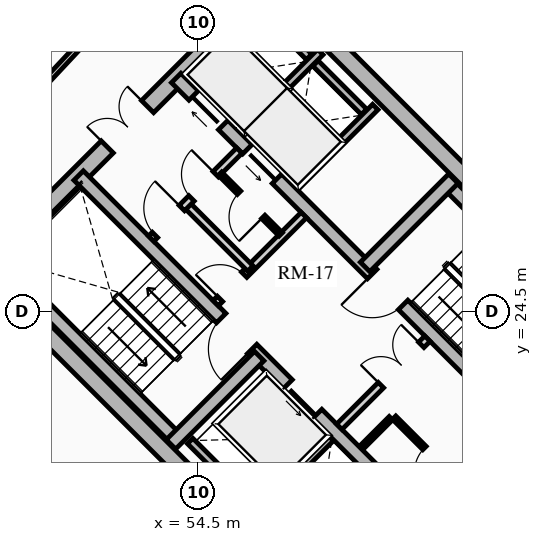
"""IFC4 building model, lengths in metres.
Left out: names, types, materials, properties, quantities, classifications, styles, units other than length and angle.
Written with IfcOpenShell. Run it as: python <this file> out.ifc"""

import sys

from ifc_helpers import new_model, si_unit, direction, frame, frame_2d, origin, place, context, subcontext, project, spatial, rectangle, extrude, source, transform, mapped, element, fill, save


model = new_model("IFC4")
c1 = context("Model", 3, precision=1e-05, world=origin(), true_north=direction((0.0, 1.0)))
c2 = subcontext(c1, "Body", "Model", "MODEL_VIEW")
j1 = project(units=[si_unit("LENGTHUNIT", "METRE"), si_unit("PLANEANGLEUNIT", "RADIAN")], contexts=[c1])
p1 = place(None, origin())
s1 = spatial("IfcSite", under=j1, at=p1, CompositionType="ELEMENT")
p2 = place(p1, origin())
s2 = spatial("IfcBuilding", under=s1, at=p2, CompositionType="ELEMENT")
p3 = place(p2, frame((0.0, 0.0, 122.53)))
s3 = spatial("IfcBuildingStorey", under=s2, at=p3, CompositionType="ELEMENT", Elevation=122.53)
for number, where, z_axis, x_axis in (
    (1, (58.737, 15.697, 0.0), (0.0, 0.0, 1.0), (-0.707, 0.707, 0.0)),
    (2, (66.303, 23.263, 0.0), (0.0, 0.0, 1.0), (-0.707, 0.707, 0.0)),
):
    element("IfcWall", number, at=place(p3, frame(where, z_axis=z_axis, x_axis=x_axis)), inside=s3, PredefinedType="SHEAR", context=c2, shape_type="SweptSolid", body=[
        extrude(rectangle(XDim=14.2, YDim=0.45, at=frame_2d((7.1, 0.0))), origin(), (0.0, 0.0, 1.0), 2.91),
    ])
p4 = place(p3, frame((58.578, 15.856, 0.0), z_axis=(0.0, 0.0, 1.0), x_axis=(0.707106781187, 0.707106781187, 0.0)))
e3 = element("IfcWall", 3, at=p4, inside=s3, PredefinedType="SHEAR", context=c2, shape_type="SweptSolid", body=[
    extrude(rectangle(XDim=10.7, YDim=0.45, at=frame_2d((5.35, 0.0))), origin(), (0.0, 0.0, 1.0), 2.91),
])
m1 = source(origin(), c2, "Body", "SweptSolid", [
    extrude(rectangle(XDim=1.5, YDim=2.02, at=frame_2d((0.75, 1.01))), frame((0.0, 0.235, 0.0), z_axis=(0.0, -1.0, 0.0), x_axis=(1.0, 0.0, 0.0)), (0.0, 0.0, 1.0), 0.47),
])
p5 = place(p4, frame((5.45, 0.0, 0.0)))
e4 = element("IfcOpeningElement", 4, at=p5, cuts=e3, PredefinedType="OPENING", context=c2, shape_type="MappedRepresentation", body=[
    mapped(m1, transform((0.0, 0.0, 0.0), x_axis=(1.0, 0.0, 0.0), y_axis=(0.0, 1.0, 0.0), z_axis=(0.0, 0.0, 1.0), scale=1.0)),
])
p6 = place(p3, frame((48.856, 25.578, 0.0), z_axis=(0.0, 0.0, 1.0), x_axis=(0.707106781187, 0.707106781187, 0.0)))
e5 = element("IfcWall", 5, at=p6, inside=s3, PredefinedType="SHEAR", context=c2, shape_type="SweptSolid", body=[
    extrude(rectangle(XDim=10.7, YDim=0.45, at=frame_2d((5.35, 0.0))), origin(), (0.0, 0.0, 1.0), 2.91),
])
p7 = place(p6, frame((4.6, 0.0, 0.0)))
e6 = element("IfcOpeningElement", 6, at=p7, cuts=e5, PredefinedType="OPENING", context=c2, shape_type="MappedRepresentation", body=[
    mapped(m1, transform((0.0, 0.0, 0.0), x_axis=(1.0, 0.0, 0.0), y_axis=(0.0, 1.0, 0.0), z_axis=(0.0, 0.0, 1.0), scale=1.0)),
])
p8 = place(p3, frame((61.078, 18.355, 0.0), z_axis=(0.0, 0.0, 1.0), x_axis=(-0.707106781187, 0.707106781187, 0.0)))
e7 = element("IfcWall", 7, at=p8, inside=s3, PredefinedType="SHEAR", context=c2, shape_type="SweptSolid", body=[
    extrude(rectangle(XDim=13.75, YDim=0.35, at=frame_2d((6.875, 0.0))), origin(), (0.0, 0.0, 1.0), 2.91),
])
m2 = source(origin(), c2, "Body", "SweptSolid", [
    extrude(rectangle(XDim=1.1, YDim=2.015, at=frame_2d((0.55, 1.007))), frame((0.0, 0.185, 0.0), z_axis=(0.0, -1.0, 0.0), x_axis=(1.0, 0.0, 0.0)), (0.0, 0.0, 1.0), 0.37),
])
p9 = place(p8, frame((4.875, 0.0, 0.0)))
e8 = element("IfcOpeningElement", 8, at=p9, cuts=e7, PredefinedType="OPENING", context=c2, shape_type="MappedRepresentation", body=[
    mapped(m2, transform((0.0, 0.0, 0.0), x_axis=(1.0, 0.0, 0.0), y_axis=(0.0, 1.0, 0.0), z_axis=(0.0, 0.0, 1.0), scale=1.0)),
])
m3 = source(origin(), c2, "Body", "SweptSolid", [
    extrude(rectangle(XDim=1.15, YDim=2.02, at=frame_2d((0.575, 1.01))), frame((0.0, 0.185, 0.0), z_axis=(0.0, -1.0, 0.0), x_axis=(1.0, 0.0, 0.0)), (0.0, 0.0, 1.0), 0.37),
])
p10 = place(p8, frame((7.295, 0.0, 0.0)))
e9 = element("IfcOpeningElement", 9, at=p10, cuts=e7, PredefinedType="OPENING", context=c2, shape_type="MappedRepresentation", body=[
    mapped(m3, transform((0.0, 0.0, 0.0), x_axis=(1.0, 0.0, 0.0), y_axis=(0.0, 1.0, 0.0), z_axis=(0.0, 0.0, 1.0), scale=1.0)),
])
p11 = place(p3, frame((63.645, 20.922, 0.0), z_axis=(0.0, 0.0, 1.0), x_axis=(-0.707106781187, 0.707106781187, 0.0)))
e10 = element("IfcWall", 10, at=p11, inside=s3, PredefinedType="SHEAR", context=c2, shape_type="SweptSolid", body=[
    extrude(rectangle(XDim=13.75, YDim=0.35, at=frame_2d((6.875, 0.0))), origin(), (0.0, 0.0, 1.0), 2.91),
])
p12 = place(p11, frame((10.0, 0.0, 0.0)))
e11 = element("IfcOpeningElement", 11, at=p12, cuts=e10, PredefinedType="OPENING", context=c2, shape_type="MappedRepresentation", body=[
    mapped(m2, transform((0.0, 0.0, 0.0), x_axis=(1.0, 0.0, 0.0), y_axis=(0.0, 1.0, 0.0), z_axis=(0.0, 0.0, 1.0), scale=1.0)),
])
p13 = place(p11, frame((12.0, 0.0, 0.0)))
e12 = element("IfcOpeningElement", 12, at=p13, cuts=e10, PredefinedType="OPENING", context=c2, shape_type="MappedRepresentation", body=[
    mapped(m2, transform((0.0, 0.0, 0.0), x_axis=(1.0, 0.0, 0.0), y_axis=(0.0, 1.0, 0.0), z_axis=(0.0, 0.0, 1.0), scale=1.0)),
])
p14 = place(p11, frame((5.305, 0.0, 0.0)))
e13 = element("IfcOpeningElement", 13, at=p14, cuts=e10, PredefinedType="OPENING", context=c2, shape_type="MappedRepresentation", body=[
    mapped(m3, transform((0.0, 0.0, 0.0), x_axis=(1.0, 0.0, 0.0), y_axis=(0.0, 1.0, 0.0), z_axis=(0.0, 0.0, 1.0), scale=1.0)),
])
p15 = place(p3, frame((53.922, 21.141, 0.0), z_axis=(0.0, 0.0, 1.0), x_axis=(-0.707088616009, 0.707124945897, 0.0)))
e14 = element("IfcWall", 14, at=p15, inside=s3, PredefinedType="SHEAR", context=c2, shape_type="SweptSolid", body=[
    extrude(rectangle(XDim=6.72, YDim=0.35, at=frame_2d((3.36, 0.0))), origin(), (0.0, 0.0, 1.0), 2.91),
])
p16 = place(p3, frame((53.784, 21.003, 0.0), z_axis=(0.0, 0.0, 1.0), x_axis=(0.707106781187, 0.707106781187, 0.0)))
e15 = element("IfcWall", 15, at=p16, inside=s3, PredefinedType="SHEAR", context=c2, shape_type="SweptSolid", body=[
    extrude(rectangle(XDim=3.285, YDim=0.35, at=frame_2d((1.643, 0.0))), origin(), (0.0, 0.0, 1.0), 2.91),
])
p17 = place(p3, frame((65.83, 23.107, 0.0), z_axis=(0.0, 0.0, 1.0), x_axis=(-0.707088616009, 0.707124945897, 0.0)))
e16 = element("IfcWall", 16, at=p17, inside=s3, PredefinedType="SHEAR", context=c2, shape_type="SweptSolid", body=[
    extrude(rectangle(XDim=6.72, YDim=0.35, at=frame_2d((3.36, 0.0))), origin(), (0.0, 0.0, 1.0), 2.91),
])
p18 = place(p3, frame((58.893, 25.674, 0.0), z_axis=(0.0, 0.0, 1.0), x_axis=(0.707106781187, 0.707106781187, 0.0)))
e17 = element("IfcWall", 17, at=p18, inside=s3, PredefinedType="SHEAR", context=c2, shape_type="SweptSolid", body=[
    extrude(rectangle(XDim=3.285, YDim=0.35, at=frame_2d((1.643, 0.0))), origin(), (0.0, 0.0, 1.0), 2.91),
])
p19 = place(p3, frame((55.888, 19.069, 0.0), z_axis=(0.0, 0.0, 1.0), x_axis=(0.707106781187, 0.707106781187, 0.0)))
e18 = element("IfcWall", 18, at=p19, inside=s3, PredefinedType="SHEAR", context=c2, shape_type="SweptSolid", body=[
    extrude(rectangle(XDim=2.97, YDim=0.2, at=frame_2d((1.485, 0.0))), origin(), (0.0, 0.0, 1.0), 2.91),
])
p20 = place(p3, frame((56.015, 19.366, 0.0), z_axis=(0.0, 0.0, 1.0), x_axis=(-0.707106781187, 0.707106781187, 0.0)))
e19 = element("IfcWall", 19, at=p20, inside=s3, PredefinedType="SHEAR", context=c2, shape_type="SweptSolid", body=[
    extrude(rectangle(XDim=2.44, YDim=0.2, at=frame_2d((1.22, 0.0))), origin(), (0.0, 0.0, 1.0), 2.91),
])
p21 = place(p3, frame((57.062, 27.781, 0.0), z_axis=(0.0, 0.0, 1.0), x_axis=(0.707106781187, 0.707106781187, 0.0)))
e20 = element("IfcWall", 20, at=p21, inside=s3, PredefinedType="SHEAR", context=c2, shape_type="SweptSolid", body=[
    extrude(rectangle(XDim=2.97, YDim=0.2, at=frame_2d((1.485, 0.0))), origin(), (0.0, 0.0, 1.0), 2.91),
])
p22 = place(p3, frame((55.615, 29.227, 0.0), z_axis=(0.0, 0.0, 1.0), x_axis=(0.707147878904, 0.70706568108, 0.0)))
e21 = element("IfcWall", 21, at=p22, inside=s3, PredefinedType="SHEAR", context=c2, shape_type="SweptSolid", body=[
    extrude(rectangle(XDim=2.97, YDim=0.2, at=frame_2d((1.485, 0.0))), origin(), (0.0, 0.0, 1.0), 2.91),
])
p23 = place(p3, frame((58.865, 29.754, 0.0), z_axis=(0.0, 0.0, 1.0), x_axis=(-0.707174411312, 0.707039144592, 0.0)))
e22 = element("IfcWall", 22, at=p23, inside=s3, PredefinedType="SHEAR", context=c2, shape_type="SweptSolid", body=[
    extrude(rectangle(XDim=1.805, YDim=0.2, at=frame_2d((0.902, 0.0))), origin(), (0.0, 0.0, 1.0), 2.91),
])
p24 = place(p3, frame((57.419, 31.2, 0.0), z_axis=(0.0, 0.0, 1.0), x_axis=(-0.707032117043, 0.707181437447, 0.0)))
e23 = element("IfcWall", 23, at=p24, inside=s3, PredefinedType="SHEAR", context=c2, shape_type="SweptSolid", body=[
    extrude(rectangle(XDim=1.635, YDim=0.2, at=frame_2d((0.817, 0.0))), origin(), (0.0, 0.0, 1.0), 2.91),
])
p25 = place(p3, frame((58.214, 21.467, 0.0), z_axis=(0.0, 0.0, 1.0), x_axis=(0.707106781187, 0.707106781187, 0.0)))
e24 = element("IfcWall", 24, at=p25, inside=s3, PredefinedType="PARTITIONING", context=c2, shape_type="SweptSolid", body=[
    extrude(rectangle(XDim=3.28, YDim=0.2, at=frame_2d((1.64, 0.0))), origin(), (0.0, 0.0, 1.0), 2.615),
])
m4 = source(origin(), c2, "Body", "SweptSolid", [
    extrude(rectangle(XDim=1.5, YDim=2.02, at=frame_2d((0.75, 1.01))), frame((0.0, 0.11, 0.0), z_axis=(0.0, -1.0, 0.0), x_axis=(1.0, 0.0, 0.0)), (0.0, 0.0, 1.0), 0.22),
])
p26 = place(p25, frame((1.55, 0.0, 0.0)))
e25 = element("IfcOpeningElement", 25, at=p26, cuts=e24, PredefinedType="OPENING", context=c2, shape_type="MappedRepresentation", body=[
    mapped(m4, transform((0.0, 0.0, 0.0), x_axis=(1.0, 0.0, 0.0), y_axis=(0.0, 1.0, 0.0), z_axis=(0.0, 0.0, 1.0), scale=1.0)),
])
p27 = place(p3, frame((54.961, 24.719, 0.0), z_axis=(0.0, 0.0, 1.0), x_axis=(0.707106781187, 0.707106781187, 0.0)))
e26 = element("IfcWall", 26, at=p27, inside=s3, PredefinedType="PARTITIONING", context=c2, shape_type="SweptSolid", body=[
    extrude(rectangle(XDim=3.28, YDim=0.2, at=frame_2d((1.64, 0.0))), origin(), (0.0, 0.0, 1.0), 2.615),
])
m5 = source(origin(), c2, "Body", "SweptSolid", [
    extrude(rectangle(XDim=0.9, YDim=2.005, at=frame_2d((0.45, 1.002))), frame((0.0, 0.11, 0.0), z_axis=(0.0, -1.0, 0.0), x_axis=(1.0, 0.0, 0.0)), (0.0, 0.0, 1.0), 0.22),
])
p28 = place(p27, frame((0.16, 0.0, 0.0)))
e27 = element("IfcOpeningElement", 27, at=p28, cuts=e26, PredefinedType="OPENING", context=c2, shape_type="MappedRepresentation", body=[
    mapped(m5, transform((0.0, 0.0, 0.0), x_axis=(1.0, 0.0, 0.0), y_axis=(0.0, 1.0, 0.0), z_axis=(0.0, 0.0, 1.0), scale=1.0)),
])
p29 = place(p3, frame((55.874, 25.631, 0.0), z_axis=(0.0, 0.0, 1.0), x_axis=(-0.707157639372, 0.707055919343, 0.0)))
e28 = element("IfcWall", 28, at=p29, inside=s3, PredefinedType="PARTITIONING", context=c2, shape_type="SweptSolid", body=[
    extrude(rectangle(XDim=2.4, YDim=0.2, at=frame_2d((1.2, 0.0))), origin(), (0.0, 0.0, 1.0), 2.615),
])
p30 = place(p3, frame((53.264, 26.416, 0.0), z_axis=(0.0, 0.0, 1.0), x_axis=(0.707106781187, 0.707106781187, 0.0)))
e29 = element("IfcWall", 29, at=p30, inside=s3, PredefinedType="PARTITIONING", context=c2, shape_type="SweptSolid", body=[
    extrude(rectangle(XDim=3.28, YDim=0.2, at=frame_2d((1.64, 0.0))), origin(), (0.0, 0.0, 1.0), 2.615),
])
m6 = source(origin(), c2, "Body", "SweptSolid", [
    extrude(rectangle(XDim=1.0, YDim=2.015, at=frame_2d((0.5, 1.007))), frame((0.0, 0.11, 0.0), z_axis=(0.0, -1.0, 0.0), x_axis=(1.0, 0.0, 0.0)), (0.0, 0.0, 1.0), 0.22),
])
p31 = place(p30, frame((0.14, 0.0, 0.0)))
e30 = element("IfcOpeningElement", 30, at=p31, cuts=e29, PredefinedType="OPENING", context=c2, shape_type="MappedRepresentation", body=[
    mapped(m6, transform((0.0, 0.0, 0.0), x_axis=(1.0, 0.0, 0.0), y_axis=(0.0, 1.0, 0.0), z_axis=(0.0, 0.0, 1.0), scale=1.0)),
])
p32 = place(p30, frame((1.5, 0.0, 0.0)))
e31 = element("IfcOpeningElement", 31, at=p32, cuts=e29, PredefinedType="OPENING", context=c2, shape_type="MappedRepresentation", body=[
    mapped(m5, transform((0.0, 0.0, 0.0), x_axis=(1.0, 0.0, 0.0), y_axis=(0.0, 1.0, 0.0), z_axis=(0.0, 0.0, 1.0), scale=1.0)),
])
p33 = place(p3, frame((61.835, 19.529, 0.0), z_axis=(0.0, 0.0, 1.0), x_axis=(-0.707146413884, 0.707067146267, 0.0)))
e32 = element("IfcWall", 32, at=p33, inside=s3, PredefinedType="PARTITIONING", context=c2, shape_type="SweptSolid", body=[
    extrude(rectangle(XDim=3.08, YDim=0.125, at=frame_2d((1.54, 0.0))), origin(), (0.0, 0.0, 1.0), 2.615),
])
m7 = source(origin(), c2, "Body", "SweptSolid", [
    extrude(rectangle(XDim=0.9, YDim=2.005, at=frame_2d((0.45, 1.002))), frame((0.0, 0.073, 0.0), z_axis=(0.0, -1.0, 0.0), x_axis=(1.0, 0.0, 0.0)), (0.0, 0.0, 1.0), 0.145),
])
p34 = place(p33, frame((1.05, 0.0, 0.0)))
e33 = element("IfcOpeningElement", 33, at=p34, cuts=e32, PredefinedType="OPENING", context=c2, shape_type="MappedRepresentation", body=[
    mapped(m7, transform((0.0, 0.0, 0.0), x_axis=(1.0, 0.0, 0.0), y_axis=(0.0, 1.0, 0.0), z_axis=(0.0, 0.0, 1.0), scale=1.0)),
])
p35 = place(p3, frame((58.794, 20.915, 0.0), z_axis=(0.0, 0.0, 1.0), x_axis=(0.707106781187, 0.707106781187, 0.0)))
e34 = element("IfcWall", 34, at=p35, inside=s3, PredefinedType="PARTITIONING", context=c2, shape_type="SweptSolid", body=[
    extrude(rectangle(XDim=1.1, YDim=0.125, at=frame_2d((0.55, 0.0))), origin(), (0.0, 0.0, 1.0), 2.615),
])
p36 = place(p3, frame((56.673, 26.529, 0.0), z_axis=(0.0, 0.0, 1.0), x_axis=(-0.707052764397, 0.70716079385, 0.0)))
e35 = element("IfcWall", 35, at=p36, inside=s3, PredefinedType="PARTITIONING", context=c2, shape_type="SweptSolid", body=[
    extrude(rectangle(XDim=2.26, YDim=0.125, at=frame_2d((1.13, 0.0))), origin(), (0.0, 0.0, 1.0), 2.615),
])
p37 = place(p36, frame((0.65, 0.0, 0.0)))
e36 = element("IfcOpeningElement", 36, at=p37, cuts=e35, PredefinedType="OPENING", context=c2, shape_type="MappedRepresentation", body=[
    mapped(m7, transform((0.0, 0.0, 0.0), x_axis=(1.0, 0.0, 0.0), y_axis=(0.0, 1.0, 0.0), z_axis=(0.0, 0.0, 1.0), scale=1.0)),
])
p38 = place(p3, frame((63.086, 30.086, 0.0), z_axis=(0.0, 0.0, 1.0), x_axis=(-0.699032802832, 0.715089603172, 0.0)))
e37 = element("IfcWall", 37, at=p38, inside=s3, PredefinedType="PARTITIONING", context=c2, shape_type="SweptSolid", body=[
    extrude(rectangle(XDim=6.082, YDim=0.15, at=frame_2d((3.041, 0.0))), origin(), (0.0, 0.0, 1.0), 2.185),
])
p39 = place(p3, frame((52.079, 32.244, 0.0), z_axis=(0.0, 0.0, 1.0), x_axis=(-0.682703325574, -0.730695674854, 0.0)))
e38 = element("IfcWall", 38, at=p39, inside=s3, PredefinedType="PARTITIONING", context=c2, shape_type="SweptSolid", body=[
    extrude(rectangle(XDim=6.527, YDim=0.15, at=frame_2d((3.263, 0.0))), origin(), (0.0, 0.0, 1.0), 2.185),
])
p40 = place(p3, frame((47.729, 23.23, 0.0), z_axis=(0.0, 0.0, 1.0), x_axis=(0.696119834292, -0.717925606386, 0.0)))
e39 = element("IfcWall", 39, at=p40, inside=s3, PredefinedType="PARTITIONING", context=c2, shape_type="SweptSolid", body=[
    extrude(rectangle(XDim=6.012, YDim=0.15, at=frame_2d((3.006, 0.0))), origin(), (0.0, 0.0, 1.0), 2.615),
])
m8 = source(origin(), c2, "Body", "SweptSolid", [
    extrude(rectangle(XDim=1.1, YDim=2.015, at=frame_2d((0.55, 1.007))), frame((0.0, 0.025, 0.0), z_axis=(0.0, -1.0, 0.0), x_axis=(1.0, 0.0, 0.0)), (0.0, 0.0, 1.0), 0.05),
])
p41 = place(p9, origin())
e40 = element("IfcDoor", 40, at=p41, inside=s3, OperationType="SLIDING_TO_LEFT", PredefinedType="DOOR", context=c2, shape_type="MappedRepresentation", body=[
    mapped(m8, transform((0.0, 0.0, 0.0), x_axis=(1.0, 0.0, 0.0), y_axis=(0.0, 1.0, 0.0), z_axis=(0.0, 0.0, 1.0), scale=1.0)),
])
fill(e8, e40)
p42 = place(p12, origin())
e41 = element("IfcDoor", 41, at=p42, inside=s3, OperationType="SLIDING_TO_LEFT", PredefinedType="DOOR", context=c2, shape_type="MappedRepresentation", body=[
    mapped(m8, transform((0.0, 0.0, 0.0), x_axis=(1.0, 0.0, 0.0), y_axis=(0.0, 1.0, 0.0), z_axis=(0.0, 0.0, 1.0), scale=1.0)),
])
fill(e11, e41)
p43 = place(p13, origin())
e42 = element("IfcDoor", 42, at=p43, inside=s3, OperationType="SLIDING_TO_RIGHT", PredefinedType="DOOR", context=c2, shape_type="MappedRepresentation", body=[
    mapped(m8, transform((0.0, 0.0, 0.0), x_axis=(1.0, 0.0, 0.0), y_axis=(0.0, 1.0, 0.0), z_axis=(0.0, 0.0, 1.0), scale=1.0)),
])
fill(e12, e42)
m9 = source(origin(), c2, "Body", "SweptSolid", [
    extrude(rectangle(XDim=1.15, YDim=2.02, at=frame_2d((0.575, 1.01))), frame((0.0, 0.025, 0.0), z_axis=(0.0, -1.0, 0.0), x_axis=(1.0, 0.0, 0.0)), (0.0, 0.0, 1.0), 0.05),
])
p44 = place(p10, origin())
e43 = element("IfcDoor", 43, at=p44, inside=s3, OperationType="SINGLE_SWING_LEFT", PredefinedType="DOOR", context=c2, shape_type="MappedRepresentation", body=[
    mapped(m9, transform((0.0, 0.0, 0.0), x_axis=(1.0, 0.0, 0.0), y_axis=(0.0, 1.0, 0.0), z_axis=(0.0, 0.0, 1.0), scale=1.0)),
])
fill(e9, e43)
p45 = place(p14, origin())
e44 = element("IfcDoor", 44, at=p45, inside=s3, OperationType="SINGLE_SWING_RIGHT", PredefinedType="DOOR", context=c2, shape_type="MappedRepresentation", body=[
    mapped(m9, transform((0.0, 0.0, 0.0), x_axis=(1.0, 0.0, 0.0), y_axis=(0.0, 1.0, 0.0), z_axis=(0.0, 0.0, 1.0), scale=1.0)),
])
fill(e13, e44)
m10 = source(origin(), c2, "Body", "SweptSolid", [
    extrude(rectangle(XDim=1.5, YDim=2.02, at=frame_2d((0.75, 1.01))), frame((0.0, 0.025, 0.0), z_axis=(0.0, -1.0, 0.0), x_axis=(1.0, 0.0, 0.0)), (0.0, 0.0, 1.0), 0.05),
])
p46 = place(p7, origin())
e45 = element("IfcDoor", 45, at=p46, inside=s3, OperationType="DOUBLE_DOOR_SINGLE_SWING", PredefinedType="DOOR", context=c2, shape_type="MappedRepresentation", body=[
    mapped(m10, transform((0.0, 0.0, 0.0), x_axis=(1.0, 0.0, 0.0), y_axis=(0.0, 1.0, 0.0), z_axis=(0.0, 0.0, 1.0), scale=1.0)),
])
fill(e6, e45)
p47 = place(p26, origin())
e46 = element("IfcDoor", 46, at=p47, inside=s3, OperationType="DOUBLE_DOOR_SINGLE_SWING", PredefinedType="DOOR", context=c2, shape_type="MappedRepresentation", body=[
    mapped(m10, transform((0.0, 0.0, 0.0), x_axis=(1.0, 0.0, 0.0), y_axis=(0.0, 1.0, 0.0), z_axis=(0.0, 0.0, 1.0), scale=1.0)),
])
fill(e25, e46)
m11 = source(origin(), c2, "Body", "SweptSolid", [
    extrude(rectangle(XDim=0.9, YDim=2.005, at=frame_2d((0.45, 1.002))), frame((0.0, 0.025, 0.0), z_axis=(0.0, -1.0, 0.0), x_axis=(1.0, 0.0, 0.0)), (0.0, 0.0, 1.0), 0.05),
])
p48 = place(p28, origin())
e47 = element("IfcDoor", 47, at=p48, inside=s3, OperationType="SINGLE_SWING_LEFT", PredefinedType="DOOR", context=c2, shape_type="MappedRepresentation", body=[
    mapped(m11, transform((0.0, 0.0, 0.0), x_axis=(1.0, 0.0, 0.0), y_axis=(0.0, 1.0, 0.0), z_axis=(0.0, 0.0, 1.0), scale=1.0)),
])
fill(e27, e47)
m12 = source(origin(), c2, "Body", "SweptSolid", [
    extrude(rectangle(XDim=1.0, YDim=2.015, at=frame_2d((0.5, 1.007))), frame((0.0, 0.025, 0.0), z_axis=(0.0, -1.0, 0.0), x_axis=(1.0, 0.0, 0.0)), (0.0, 0.0, 1.0), 0.05),
])
p49 = place(p31, origin())
e48 = element("IfcDoor", 48, at=p49, inside=s3, OperationType="SINGLE_SWING_RIGHT", PredefinedType="DOOR", context=c2, shape_type="MappedRepresentation", body=[
    mapped(m12, transform((0.0, 0.0, 0.0), x_axis=(1.0, 0.0, 0.0), y_axis=(0.0, 1.0, 0.0), z_axis=(0.0, 0.0, 1.0), scale=1.0)),
])
fill(e30, e48)
p50 = place(p34, origin())
e49 = element("IfcDoor", 49, at=p50, inside=s3, OperationType="SINGLE_SWING_LEFT", PredefinedType="DOOR", context=c2, shape_type="MappedRepresentation", body=[
    mapped(m11, transform((0.0, 0.0, 0.0), x_axis=(1.0, 0.0, 0.0), y_axis=(0.0, 1.0, 0.0), z_axis=(0.0, 0.0, 1.0), scale=1.0)),
])
fill(e33, e49)
p51 = place(p32, origin())
e50 = element("IfcDoor", 50, at=p51, inside=s3, OperationType="SINGLE_SWING_RIGHT", PredefinedType="DOOR", context=c2, shape_type="MappedRepresentation", body=[
    mapped(m11, transform((0.0, 0.0, 0.0), x_axis=(1.0, 0.0, 0.0), y_axis=(0.0, 1.0, 0.0), z_axis=(0.0, 0.0, 1.0), scale=1.0)),
])
fill(e31, e50)
p52 = place(p37, origin())
e51 = element("IfcDoor", 51, at=p52, inside=s3, OperationType="SINGLE_SWING_LEFT", PredefinedType="DOOR", context=c2, shape_type="MappedRepresentation", body=[
    mapped(m11, transform((0.0, 0.0, 0.0), x_axis=(1.0, 0.0, 0.0), y_axis=(0.0, 1.0, 0.0), z_axis=(0.0, 0.0, 1.0), scale=1.0)),
])
fill(e36, e51)
save(model, sys.argv[1])
